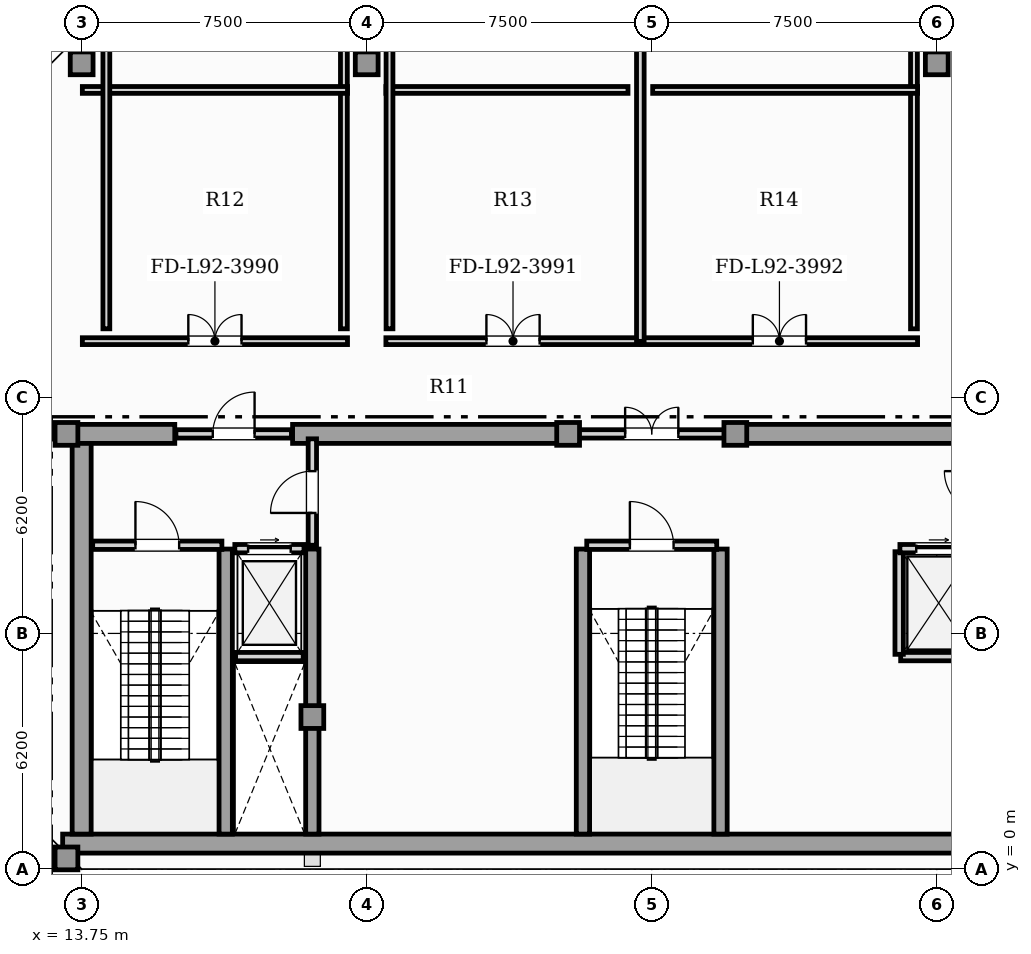
"""IFC4 building model, lengths in metres.
Left out: names, types, materials, properties, quantities, classifications, styles, units other than length and angle.
Written with IfcOpenShell. Run it as: python <this file> out.ifc"""

import sys

from ifc_helpers import new_model, si_unit, direction, frame, frame_2d, origin, origin_2d, place, context, subcontext, project, spatial, rectangle, hollow_rectangle, extrude, element, fill, save


model = new_model("IFC4")
c1 = context("Model", 3, precision=1e-05, world=origin(), true_north=direction((0.0, 1.0)))
c2 = subcontext(c1, "Body", "Model", "MODEL_VIEW")
j1 = project(units=[si_unit("LENGTHUNIT", "METRE"), si_unit("PLANEANGLEUNIT", "RADIAN")], contexts=[c1])
p1 = place(None, origin())
s1 = spatial("IfcSite", under=j1, at=p1, CompositionType="ELEMENT")
p2 = place(p1, origin())
s2 = spatial("IfcBuilding", under=s1, at=p2, CompositionType="ELEMENT")
p3 = place(p2, frame((0.0, 0.0, 377.45)))
s3 = spatial("IfcBuildingStorey", under=s2, at=p3, CompositionType="ELEMENT", Elevation=377.45)
p4 = place(p3, frame((13.25, 0.67, 0.0), z_axis=(0.0, 0.0, 1.0), x_axis=(1.0, 0.0, 0.0)))
e1 = element("IfcWall", 1, at=p4, inside=s3, PredefinedType="SHEAR", context=c2, shape_type="SweptSolid", body=[
    extrude(rectangle(XDim=31.0, YDim=0.5, at=frame_2d((15.5, 0.0))), origin(), (0.0, 0.0, 1.0), 5.1),
])
p5 = place(p3, frame((13.75, 0.92, 0.0), z_axis=(0.0, 0.0, 1.0), x_axis=(0.0, 1.0, 0.0)))
e2 = element("IfcWall", 2, at=p5, inside=s3, PredefinedType="SHEAR", context=c2, shape_type="SweptSolid", body=[
    extrude(rectangle(XDim=10.53, YDim=0.5, at=frame_2d((5.265, 0.0))), origin(), (0.0, 0.0, 1.0), 5.1),
])
p6 = place(p3, frame((13.25, 11.45, 0.0), z_axis=(0.0, 0.0, 1.0), x_axis=(1.0, 0.0, 0.0)))
e3 = element("IfcWall", 3, at=p6, inside=s3, PredefinedType="SHEAR", context=c2, shape_type="SweptSolid", body=[
    extrude(rectangle(XDim=2.95, YDim=0.5, at=frame_2d((1.475, 0.0))), origin(), (0.0, 0.0, 1.0), 5.1),
])
for number, where, z_axis, x_axis in (
    (4, (19.3, 11.45, 0.0), (0.0, 0.0, 1.0), (1.0, 0.0, 0.0)),
    (5, (30.9, 11.45, 0.0), (0.0, 0.0, 1.0), (1.0, 0.0, 0.0)),
):
    element("IfcWall", number, at=place(p3, frame(where, z_axis=z_axis, x_axis=x_axis)), inside=s3, PredefinedType="SHEAR", context=c2, shape_type="SweptSolid", body=[
        extrude(rectangle(XDim=7.3, YDim=0.5, at=frame_2d((3.65, 0.0))), origin(), (0.0, 0.0, 1.0), 5.1),
    ])
for number, where, z_axis, x_axis in (
    (6, (17.54, 0.92, 0.0), (0.0, 0.0, 1.0), (0.0, 1.0, 0.0)),
    (7, (19.82, 0.92, 0.0), (0.0, 0.0, 1.0), (0.0, 1.0, 0.0)),
    (8, (26.94, 0.92, 0.0), (0.0, 0.0, 1.0), (0.0, 1.0, 0.0)),
    (9, (30.56, 0.92, 0.0), (0.0, 0.0, 1.0), (0.0, 1.0, 0.0)),
):
    element("IfcWall", number, at=place(p3, frame(where, z_axis=z_axis, x_axis=x_axis)), inside=s3, PredefinedType="SHEAR", context=c2, shape_type="SweptSolid", body=[
        extrude(rectangle(XDim=7.5, YDim=0.35, at=frame_2d((3.75, 0.0))), origin(), (0.0, 0.0, 1.0), 5.1),
    ])
for number, where, z_axis, x_axis in (
    (10, (13.35, 0.28, 0.0), (0.0, 0.0, 1.0), (1.0, 0.0, 0.0)),
    (11, (13.35, 11.45, 0.0), (0.0, 0.0, 1.0), (1.0, 0.0, 0.0)),
    (12, (19.82, 4.0, 0.0), (0.0, 0.0, 1.0), (1.0, 0.0, 0.0)),
    (13, (26.55, 11.45, 0.0), (0.0, 0.0, 1.0), (1.0, 0.0, 0.0)),
    (14, (30.95, 11.45, 0.0), (0.0, 0.0, 1.0), (1.0, 0.0, 0.0)),
    (15, (13.75, 21.2, 0.0), (0.0, 0.0, 1.0), (1.0, 0.0, 0.0)),
    (16, (21.25, 21.2, 0.0), (0.0, 0.0, 1.0), (1.0, 0.0, 0.0)),
    (17, (36.25, 21.2, 0.0), (0.0, 0.0, 1.0), (1.0, 0.0, 0.0)),
):
    element("IfcColumn", number, at=place(p3, frame(where, z_axis=z_axis, x_axis=x_axis)), inside=s3, PredefinedType="USERDEFINED", context=c2, shape_type="SweptSolid", body=[
        extrude(hollow_rectangle(XDim=0.6, YDim=0.6, WallThickness=0.04, at=origin_2d()), origin(), (0.0, 0.0, 1.0), 5.4),
    ])
p7 = place(p3, frame((17.8, 5.59, 0.0), z_axis=(0.0, 0.0, 1.0), x_axis=(1.0, 0.0, 0.0)))
e18 = element("IfcWall", 18, at=p7, inside=s3, PredefinedType="SOLIDWALL", context=c2, shape_type="SweptSolid", body=[
    extrude(rectangle(XDim=1.78, YDim=0.22, at=frame_2d((0.89, 0.0))), origin(), (0.0, 0.0, 1.0), 5.1),
])
p8 = place(p3, frame((17.78, 8.43, 0.0), z_axis=(0.0, 0.0, 1.0), x_axis=(1.0, 0.0, 0.0)))
e19 = element("IfcWall", 19, at=p8, inside=s3, PredefinedType="SOLIDWALL", context=c2, shape_type="SweptSolid", body=[
    extrude(rectangle(XDim=1.82, YDim=0.22, at=frame_2d((0.91, 0.0))), origin(), (0.0, 0.0, 1.0), 5.1),
])
p9 = place(p8, frame((0.35, 0.0, 0.0)))
e20 = element("IfcOpeningElement", 20, at=p9, cuts=e19, PredefinedType="OPENING", context=c2, shape_type="SweptSolid", body=[
    extrude(rectangle(XDim=1.12, YDim=2.25, at=frame_2d((0.56, 1.125))), frame((0.0, 0.12, 0.0), z_axis=(0.0, -1.0, 0.0), x_axis=(1.0, 0.0, 0.0)), (0.0, 0.0, 1.0), 0.24),
])
p10 = place(p3, frame((35.3, 5.59, 0.0), z_axis=(0.0, 0.0, 1.0), x_axis=(1.0, 0.0, 0.0)))
e21 = element("IfcWall", 21, at=p10, inside=s3, PredefinedType="SOLIDWALL", context=c2, shape_type="SweptSolid", body=[
    extrude(rectangle(XDim=2.0, YDim=0.22, at=frame_2d((1.0, 0.0))), origin(), (0.0, 0.0, 1.0), 5.1),
])
p11 = place(p3, frame((35.26, 5.65, 0.0), z_axis=(0.0, 0.0, 1.0), x_axis=(0.0, 1.0, 0.0)))
e22 = element("IfcWall", 22, at=p11, inside=s3, PredefinedType="SOLIDWALL", context=c2, shape_type="SweptSolid", body=[
    extrude(rectangle(XDim=2.7, YDim=0.22, at=frame_2d((1.35, 0.0))), origin(), (0.0, 0.0, 1.0), 5.1),
])
p12 = place(p3, frame((35.28, 8.43, 0.0), z_axis=(0.0, 0.0, 1.0), x_axis=(1.0, 0.0, 0.0)))
e23 = element("IfcWall", 23, at=p12, inside=s3, PredefinedType="SOLIDWALL", context=c2, shape_type="SweptSolid", body=[
    extrude(rectangle(XDim=2.04, YDim=0.22, at=frame_2d((1.02, 0.0))), origin(), (0.0, 0.0, 1.0), 5.1),
])
p13 = place(p12, frame((0.43, 0.0, 0.0)))
e24 = element("IfcOpeningElement", 24, at=p13, cuts=e23, PredefinedType="OPENING", context=c2, shape_type="SweptSolid", body=[
    extrude(rectangle(XDim=1.18, YDim=2.2, at=frame_2d((0.59, 1.1))), frame((0.0, 0.12, 0.0), z_axis=(0.0, -1.0, 0.0), x_axis=(1.0, 0.0, 0.0)), (0.0, 0.0, 1.0), 0.24),
])
p14 = place(p3, frame((14.04, 8.52, 0.0), z_axis=(0.0, 0.0, 1.0), x_axis=(1.0, 0.0, 0.0)))
e25 = element("IfcWall", 25, at=p14, inside=s3, PredefinedType="SOLIDWALL", context=c2, shape_type="SweptSolid", body=[
    extrude(rectangle(XDim=3.4, YDim=0.22, at=frame_2d((1.7, 0.0))), origin(), (0.0, 0.0, 1.0), 5.1),
])
p15 = place(p14, frame((1.125, 0.0, 0.0)))
e26 = element("IfcOpeningElement", 26, at=p15, cuts=e25, PredefinedType="OPENING", context=c2, shape_type="SweptSolid", body=[
    extrude(rectangle(XDim=1.15, YDim=2.2, at=frame_2d((0.575, 1.1))), frame((0.0, 0.12, 0.0), z_axis=(0.0, -1.0, 0.0), x_axis=(1.0, 0.0, 0.0)), (0.0, 0.0, 1.0), 0.24),
])
p16 = place(p3, frame((27.04, 8.52, 0.0), z_axis=(0.0, 0.0, 1.0), x_axis=(1.0, 0.0, 0.0)))
e27 = element("IfcWall", 27, at=p16, inside=s3, PredefinedType="SOLIDWALL", context=c2, shape_type="SweptSolid", body=[
    extrude(rectangle(XDim=3.42, YDim=0.22, at=frame_2d((1.71, 0.0))), origin(), (0.0, 0.0, 1.0), 5.1),
])
p17 = place(p16, frame((1.135, 0.0, 0.0)))
e28 = element("IfcOpeningElement", 28, at=p17, cuts=e27, PredefinedType="OPENING", context=c2, shape_type="SweptSolid", body=[
    extrude(rectangle(XDim=1.15, YDim=2.2, at=frame_2d((0.575, 1.1))), frame((0.0, 0.12, 0.0), z_axis=(0.0, -1.0, 0.0), x_axis=(1.0, 0.0, 0.0)), (0.0, 0.0, 1.0), 0.24),
])
p18 = place(p3, frame((19.82, 8.52, 0.0), z_axis=(0.0, 0.0, 1.0), x_axis=(0.0, 1.0, 0.0)))
e29 = element("IfcWall", 29, at=p18, inside=s3, PredefinedType="SOLIDWALL", context=c2, shape_type="SweptSolid", body=[
    extrude(rectangle(XDim=2.8, YDim=0.22, at=frame_2d((1.4, 0.0))), origin(), (0.0, 0.0, 1.0), 4.556),
])
p19 = place(p18, frame((0.85, 0.0, 0.0)))
e30 = element("IfcOpeningElement", 30, at=p19, cuts=e29, PredefinedType="OPENING", context=c2, shape_type="SweptSolid", body=[
    extrude(rectangle(XDim=1.1, YDim=2.2, at=frame_2d((0.55, 1.1))), frame((0.0, 0.12, 0.0), z_axis=(0.0, -1.0, 0.0), x_axis=(1.0, 0.0, 0.0)), (0.0, 0.0, 1.0), 0.24),
])
p20 = place(p3, frame((16.23, 11.45, 0.0), z_axis=(0.0, 0.0, 1.0), x_axis=(1.0, 0.0, 0.0)))
e31 = element("IfcWall", 31, at=p20, inside=s3, PredefinedType="SOLIDWALL", context=c2, shape_type="SweptSolid", body=[
    extrude(rectangle(XDim=3.04, YDim=0.22, at=frame_2d((1.52, 0.0))), origin(), (0.0, 0.0, 1.0), 5.1),
])
p21 = place(p20, frame((0.97, 0.0, 0.0)))
e32 = element("IfcOpeningElement", 32, at=p21, cuts=e31, PredefinedType="OPENING", context=c2, shape_type="SweptSolid", body=[
    extrude(rectangle(XDim=1.1, YDim=2.2, at=frame_2d((0.55, 1.1))), frame((0.0, 0.12, 0.0), z_axis=(0.0, -1.0, 0.0), x_axis=(1.0, 0.0, 0.0)), (0.0, 0.0, 1.0), 0.24),
])
p22 = place(p3, frame((26.63, 11.45, 0.0), z_axis=(0.0, 0.0, 1.0), x_axis=(1.0, 0.0, 0.0)))
e33 = element("IfcWall", 33, at=p22, inside=s3, PredefinedType="SOLIDWALL", context=c2, shape_type="SweptSolid", body=[
    extrude(rectangle(XDim=4.24, YDim=0.22, at=frame_2d((2.12, 0.0))), origin(), (0.0, 0.0, 1.0), 5.1),
])
p23 = place(p22, frame((1.42, 0.0, 0.0)))
e34 = element("IfcOpeningElement", 34, at=p23, cuts=e33, PredefinedType="OPENING", context=c2, shape_type="SweptSolid", body=[
    extrude(rectangle(XDim=1.4, YDim=2.2, at=frame_2d((0.7, 1.1))), frame((0.0, 0.12, 0.0), z_axis=(0.0, -1.0, 0.0), x_axis=(1.0, 0.0, 0.0)), (0.0, 0.0, 1.0), 0.24),
])
p24 = place(p3, frame((13.768, 13.89, 0.0), z_axis=(0.0, 0.0, 1.0), x_axis=(1.0, 0.0, 0.0)))
e35 = element("IfcWall", 35, at=p24, inside=s3, PredefinedType="PARTITIONING", context=c2, shape_type="SweptSolid", body=[
    extrude(rectangle(XDim=6.977, YDim=0.18, at=frame_2d((3.489, 0.0))), origin(), (0.0, 0.0, 1.0), 5.1),
])
p25 = place(p24, frame((2.789, 0.0, 0.0)))
e36 = element("IfcOpeningElement", 36, at=p25, cuts=e35, PredefinedType="OPENING", context=c2, shape_type="SweptSolid", body=[
    extrude(rectangle(XDim=1.4, YDim=2.2, at=frame_2d((0.7, 1.1))), frame((0.0, 0.1, 0.0), z_axis=(0.0, -1.0, 0.0), x_axis=(1.0, 0.0, 0.0)), (0.0, 0.0, 1.0), 0.2),
])
p26 = place(p3, frame((21.755, 13.89, 0.0), z_axis=(0.0, 0.0, 1.0), x_axis=(1.0, 0.0, 0.0)))
e37 = element("IfcWall", 37, at=p26, inside=s3, PredefinedType="PARTITIONING", context=c2, shape_type="SweptSolid", body=[
    extrude(rectangle(XDim=6.69, YDim=0.18, at=frame_2d((3.345, 0.0))), origin(), (0.0, 0.0, 1.0), 5.1),
])
p27 = place(p26, frame((2.645, 0.0, 0.0)))
e38 = element("IfcOpeningElement", 38, at=p27, cuts=e37, PredefinedType="OPENING", context=c2, shape_type="SweptSolid", body=[
    extrude(rectangle(XDim=1.4, YDim=2.2, at=frame_2d((0.7, 1.1))), frame((0.0, 0.1, 0.0), z_axis=(0.0, -1.0, 0.0), x_axis=(1.0, 0.0, 0.0)), (0.0, 0.0, 1.0), 0.2),
])
p28 = place(p3, frame((28.475, 13.89, 0.0), z_axis=(0.0, 0.0, 1.0), x_axis=(1.0, 0.0, 0.0)))
e39 = element("IfcWall", 39, at=p28, inside=s3, PredefinedType="PARTITIONING", context=c2, shape_type="SweptSolid", body=[
    extrude(rectangle(XDim=7.27, YDim=0.18, at=frame_2d((3.635, 0.0))), origin(), (0.0, 0.0, 1.0), 5.1),
])
p29 = place(p28, frame((2.935, 0.0, 0.0)))
e40 = element("IfcOpeningElement", 40, at=p29, cuts=e39, PredefinedType="OPENING", context=c2, shape_type="SweptSolid", body=[
    extrude(rectangle(XDim=1.4, YDim=2.2, at=frame_2d((0.7, 1.1))), frame((0.0, 0.1, 0.0), z_axis=(0.0, -1.0, 0.0), x_axis=(1.0, 0.0, 0.0)), (0.0, 0.0, 1.0), 0.2),
])
p30 = place(p3, frame((28.45, 13.885, 0.0), z_axis=(0.0, 0.0, 1.0), x_axis=(0.0, 1.0, 0.0)))
e41 = element("IfcWall", 41, at=p30, inside=s3, PredefinedType="PARTITIONING", context=c2, shape_type="SweptSolid", body=[
    extrude(rectangle(XDim=8.097, YDim=0.2, at=frame_2d((4.048, 0.0))), origin(), (0.0, 0.0, 1.0), 5.1),
])
p31 = place(p3, frame((20.65, 14.215, 0.0), z_axis=(0.0, 0.0, 1.0), x_axis=(0.0, 1.0, 0.0)))
e42 = element("IfcWall", 42, at=p31, inside=s3, PredefinedType="PARTITIONING", context=c2, shape_type="SweptSolid", body=[
    extrude(rectangle(XDim=7.767, YDim=0.18, at=frame_2d((3.883, 0.0))), origin(), (0.0, 0.0, 1.0), 5.1),
])
p32 = place(p3, frame((20.745, 20.5, 0.0), z_axis=(0.0, 0.0, 1.0), x_axis=(-1.0, 0.0, 0.0)))
e43 = element("IfcWall", 43, at=p32, inside=s3, PredefinedType="PARTITIONING", context=c2, shape_type="SweptSolid", body=[
    extrude(rectangle(XDim=6.977, YDim=0.18, at=frame_2d((3.489, 0.0))), origin(), (0.0, 0.0, 1.0), 5.1),
])
p33 = place(p3, frame((14.4, 21.991, 0.0), z_axis=(0.0, 0.0, 1.0), x_axis=(0.0, -1.0, 0.0)))
e44 = element("IfcWall", 44, at=p33, inside=s3, PredefinedType="PARTITIONING", context=c2, shape_type="SweptSolid", body=[
    extrude(rectangle(XDim=7.776, YDim=0.18, at=frame_2d((3.888, 0.0))), origin(), (0.0, 0.0, 1.0), 5.1),
])
p34 = place(p3, frame((28.125, 20.5, 0.0), z_axis=(0.0, 0.0, 1.0), x_axis=(-1.0, 0.0, 0.0)))
e45 = element("IfcWall", 45, at=p34, inside=s3, PredefinedType="PARTITIONING", context=c2, shape_type="SweptSolid", body=[
    extrude(rectangle(XDim=6.37, YDim=0.18, at=frame_2d((3.185, 0.0))), origin(), (0.0, 0.0, 1.0), 5.1),
])
for number, where, z_axis, x_axis in (
    (46, (21.85, 21.982, 0.0), (0.0, 0.0, 1.0), (0.0, -1.0, 0.0)),
    (47, (35.65, 14.215, 0.0), (0.0, 0.0, 1.0), (0.0, 1.0, 0.0)),
):
    element("IfcWall", number, at=place(p3, frame(where, z_axis=z_axis, x_axis=x_axis)), inside=s3, PredefinedType="PARTITIONING", context=c2, shape_type="SweptSolid", body=[
        extrude(rectangle(XDim=7.767, YDim=0.18, at=frame_2d((3.883, 0.0))), origin(), (0.0, 0.0, 1.0), 5.1),
    ])
p35 = place(p3, frame((35.745, 20.5, 0.0), z_axis=(0.0, 0.0, 1.0), x_axis=(-1.0, 0.0, 0.0)))
e48 = element("IfcWall", 48, at=p35, inside=s3, PredefinedType="PARTITIONING", context=c2, shape_type="SweptSolid", body=[
    extrude(rectangle(XDim=6.97, YDim=0.18, at=frame_2d((3.485, 0.0))), origin(), (0.0, 0.0, 1.0), 5.1),
])
p36 = place(p9, origin())
e49 = element("IfcDoor", 49, at=p36, inside=s3, OperationType="SLIDING_TO_RIGHT", PredefinedType="DOOR", context=c2, shape_type="SweptSolid", body=[
    extrude(rectangle(XDim=1.12, YDim=2.25, at=frame_2d((0.56, 1.125))), frame((0.0, 0.025, 0.0), z_axis=(0.0, -1.0, 0.0), x_axis=(1.0, 0.0, 0.0)), (0.0, 0.0, 1.0), 0.05),
])
fill(e20, e49)
p37 = place(p13, origin())
e50 = element("IfcDoor", 50, at=p37, inside=s3, OperationType="SLIDING_TO_RIGHT", PredefinedType="DOOR", context=c2, shape_type="SweptSolid", body=[
    extrude(rectangle(XDim=1.18, YDim=2.2, at=frame_2d((0.59, 1.1))), frame((0.0, 0.025, 0.0), z_axis=(0.0, -1.0, 0.0), x_axis=(1.0, 0.0, 0.0)), (0.0, 0.0, 1.0), 0.05),
])
fill(e24, e50)
p38 = place(p15, origin())
e51 = element("IfcDoor", 51, at=p38, inside=s3, OperationType="SINGLE_SWING_LEFT", PredefinedType="DOOR", context=c2, shape_type="SweptSolid", body=[
    extrude(rectangle(XDim=1.15, YDim=2.2, at=frame_2d((0.575, 1.1))), frame((0.0, 0.025, 0.0), z_axis=(0.0, -1.0, 0.0), x_axis=(1.0, 0.0, 0.0)), (0.0, 0.0, 1.0), 0.05),
])
fill(e26, e51)
p39 = place(p17, origin())
e52 = element("IfcDoor", 52, at=p39, inside=s3, OperationType="SINGLE_SWING_LEFT", PredefinedType="DOOR", context=c2, shape_type="SweptSolid", body=[
    extrude(rectangle(XDim=1.15, YDim=2.2, at=frame_2d((0.575, 1.1))), frame((0.0, 0.025, 0.0), z_axis=(0.0, -1.0, 0.0), x_axis=(1.0, 0.0, 0.0)), (0.0, 0.0, 1.0), 0.05),
])
fill(e28, e52)
p40 = place(p19, origin())
e53 = element("IfcDoor", 53, at=p40, inside=s3, OperationType="SINGLE_SWING_LEFT", PredefinedType="DOOR", context=c2, shape_type="SweptSolid", body=[
    extrude(rectangle(XDim=1.1, YDim=2.2, at=frame_2d((0.55, 1.1))), frame((0.0, 0.025, 0.0), z_axis=(0.0, -1.0, 0.0), x_axis=(1.0, 0.0, 0.0)), (0.0, 0.0, 1.0), 0.05),
])
fill(e30, e53)
p41 = place(p21, origin())
e54 = element("IfcDoor", 54, at=p41, inside=s3, OperationType="SINGLE_SWING_RIGHT", PredefinedType="DOOR", context=c2, shape_type="SweptSolid", body=[
    extrude(rectangle(XDim=1.1, YDim=2.2, at=frame_2d((0.55, 1.1))), frame((0.0, 0.025, 0.0), z_axis=(0.0, -1.0, 0.0), x_axis=(1.0, 0.0, 0.0)), (0.0, 0.0, 1.0), 0.05),
])
fill(e32, e54)
p42 = place(p23, origin())
e55 = element("IfcDoor", 55, at=p42, inside=s3, OperationType="DOUBLE_DOOR_SINGLE_SWING", PredefinedType="DOOR", context=c2, shape_type="SweptSolid", body=[
    extrude(rectangle(XDim=1.4, YDim=2.2, at=frame_2d((0.7, 1.1))), frame((0.0, 0.025, 0.0), z_axis=(0.0, -1.0, 0.0), x_axis=(1.0, 0.0, 0.0)), (0.0, 0.0, 1.0), 0.05),
])
fill(e34, e55)
p43 = place(p25, origin())
e56 = element("IfcDoor", 56, at=p43, inside=s3, OperationType="DOUBLE_DOOR_SINGLE_SWING", PredefinedType="DOOR", context=c2, shape_type="SweptSolid", body=[
    extrude(rectangle(XDim=1.4, YDim=2.2, at=frame_2d((0.7, 1.1))), frame((0.0, 0.025, 0.0), z_axis=(0.0, -1.0, 0.0), x_axis=(1.0, 0.0, 0.0)), (0.0, 0.0, 1.0), 0.05),
])
fill(e36, e56)
p44 = place(p27, origin())
e57 = element("IfcDoor", 57, at=p44, inside=s3, OperationType="DOUBLE_DOOR_SINGLE_SWING", PredefinedType="DOOR", context=c2, shape_type="SweptSolid", body=[
    extrude(rectangle(XDim=1.4, YDim=2.2, at=frame_2d((0.7, 1.1))), frame((0.0, 0.025, 0.0), z_axis=(0.0, -1.0, 0.0), x_axis=(1.0, 0.0, 0.0)), (0.0, 0.0, 1.0), 0.05),
])
fill(e38, e57)
p45 = place(p29, origin())
e58 = element("IfcDoor", 58, at=p45, inside=s3, OperationType="DOUBLE_DOOR_SINGLE_SWING", PredefinedType="DOOR", context=c2, shape_type="SweptSolid", body=[
    extrude(rectangle(XDim=1.4, YDim=2.2, at=frame_2d((0.7, 1.1))), frame((0.0, 0.025, 0.0), z_axis=(0.0, -1.0, 0.0), x_axis=(1.0, 0.0, 0.0)), (0.0, 0.0, 1.0), 0.05),
])
fill(e40, e58)
save(model, sys.argv[1])
